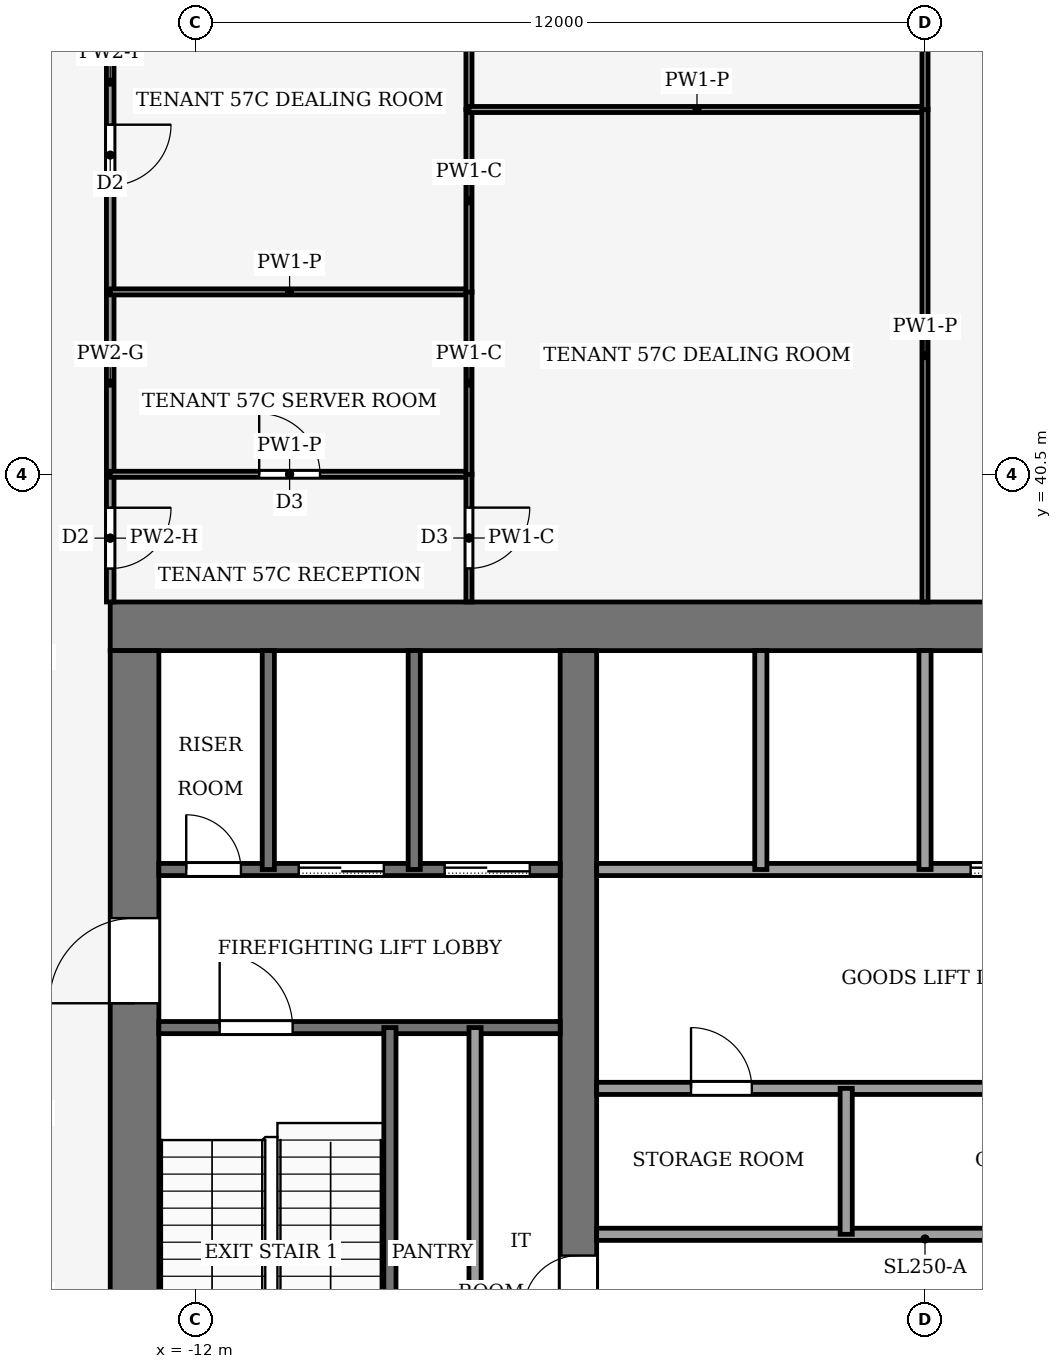
"""IFC4 building model, lengths in metres.
Left out: names, types, materials, properties, quantities, classifications, styles, units other than length and angle.
Written with IfcOpenShell. Run it as: python <this file> out.ifc"""

import sys

from ifc_helpers import new_model, si_unit, direction, frame, frame_2d, origin, place, context, subcontext, project, spatial, rectangle, extrude, element, fill, save


model = new_model("IFC4")
c1 = context("Model", 3, precision=1e-05, world=origin(), true_north=direction((0.0, 1.0)))
c2 = subcontext(c1, "Body", "Model", "MODEL_VIEW")
j1 = project(units=[si_unit("LENGTHUNIT", "METRE"), si_unit("PLANEANGLEUNIT", "RADIAN")], contexts=[c1])
p1 = place(None, origin())
s1 = spatial("IfcSite", under=j1, at=p1, CompositionType="ELEMENT")
p2 = place(p1, origin())
s2 = spatial("IfcBuilding", under=s1, at=p2, CompositionType="ELEMENT")
p3 = place(p2, frame((0.0, 0.0, 250.0)))
s3 = spatial("IfcBuildingStorey", under=s2, at=p3, CompositionType="ELEMENT", Elevation=250.0)
p4 = place(p3, frame((-13.4, 38.0, -0.13), z_axis=(0.0, 0.0, 1.0), x_axis=(1.0, 0.0, 0.0)))
e1 = element("IfcWall", 1, at=p4, inside=s3, PredefinedType="SHEAR", context=c2, shape_type="SweptSolid", body=[
    extrude(rectangle(XDim=26.8, YDim=0.8, at=frame_2d((13.4, 0.0))), origin(), (0.0, 0.0, 1.0), 4.0),
])
p5 = place(p3, frame((-13.0, 18.4, -0.13), z_axis=(0.0, 0.0, 1.0), x_axis=(0.0, 1.0, 0.0)))
e2 = element("IfcWall", 2, at=p5, inside=s3, PredefinedType="SHEAR", context=c2, shape_type="SweptSolid", body=[
    extrude(rectangle(XDim=19.2, YDim=0.8, at=frame_2d((9.6, 0.0))), origin(), (0.0, 0.0, 1.0), 4.0),
])
p6 = place(p5, frame((2.8, 0.0, 0.13)))
e3 = element("IfcOpeningElement", 3, at=p6, cuts=e2, PredefinedType="OPENING", context=c2, shape_type="SweptSolid", body=[
    extrude(rectangle(XDim=2.4, YDim=2.4, at=frame_2d((1.2, 1.2))), frame((0.0, 0.41, 0.0), z_axis=(0.0, -1.0, 0.0), x_axis=(1.0, 0.0, 0.0)), (0.0, 0.0, 1.0), 0.82),
])
p7 = place(p5, frame((13.4, 0.0, 0.13)))
e4 = element("IfcOpeningElement", 4, at=p7, cuts=e2, PredefinedType="OPENING", context=c2, shape_type="SweptSolid", body=[
    extrude(rectangle(XDim=1.4, YDim=2.2, at=frame_2d((0.7, 1.1))), frame((0.0, 0.41, 0.0), z_axis=(0.0, -1.0, 0.0), x_axis=(1.0, 0.0, 0.0)), (0.0, 0.0, 1.0), 0.82),
])
p8 = place(p3, frame((-5.7, 18.4, -0.13), z_axis=(0.0, 0.0, 1.0), x_axis=(0.0, 1.0, 0.0)))
e5 = element("IfcWall", 5, at=p8, inside=s3, PredefinedType="SHEAR", context=c2, shape_type="SweptSolid", body=[
    extrude(rectangle(XDim=19.2, YDim=0.6, at=frame_2d((9.6, 0.0))), origin(), (0.0, 0.0, 1.0), 4.0),
])
p9 = place(p8, frame((8.35, 0.0, 0.13)))
e6 = element("IfcOpeningElement", 6, at=p9, cuts=e5, PredefinedType="OPENING", context=c2, shape_type="SweptSolid", body=[
    extrude(rectangle(XDim=0.9, YDim=2.1, at=frame_2d((0.45, 1.05))), frame((0.0, 0.31, 0.0), z_axis=(0.0, -1.0, 0.0), x_axis=(1.0, 0.0, 0.0)), (0.0, 0.0, 1.0), 0.62),
])
p10 = place(p3, frame((-5.4, 28.0, 0.0), z_axis=(0.0, 0.0, 1.0), x_axis=(1.0, 0.0, 0.0)))
e7 = element("IfcWall", 7, at=p10, inside=s3, PredefinedType="PARTITIONING", context=c2, shape_type="SweptSolid", body=[
    extrude(rectangle(XDim=10.8, YDim=0.2, at=frame_2d((5.4, 0.0))), origin(), (0.0, 0.0, 1.0), 3.87),
])
p11 = place(p3, frame((-5.4, 30.4, 0.0), z_axis=(0.0, 0.0, 1.0), x_axis=(1.0, 0.0, 0.0)))
e8 = element("IfcWall", 8, at=p11, inside=s3, PredefinedType="PARTITIONING", context=c2, shape_type="SweptSolid", body=[
    extrude(rectangle(XDim=10.8, YDim=0.2, at=frame_2d((5.4, 0.0))), origin(), (0.0, 0.0, 1.0), 3.87),
])
p12 = place(p11, frame((1.552, 0.0, 0.0)))
e9 = element("IfcOpeningElement", 9, at=p12, cuts=e8, PredefinedType="OPENING", context=c2, shape_type="SweptSolid", body=[
    extrude(rectangle(XDim=1.0, YDim=2.1, at=frame_2d((0.5, 1.05))), frame((0.0, 0.11, 0.0), z_axis=(0.0, -1.0, 0.0), x_axis=(1.0, 0.0, 0.0)), (0.0, 0.0, 1.0), 0.22),
])
p13 = place(p11, frame((6.952, 0.0, 0.0)))
e10 = element("IfcOpeningElement", 10, at=p13, cuts=e8, PredefinedType="OPENING", context=c2, shape_type="SweptSolid", body=[
    extrude(rectangle(XDim=1.0, YDim=2.1, at=frame_2d((0.5, 1.05))), frame((0.0, 0.11, 0.0), z_axis=(0.0, -1.0, 0.0), x_axis=(1.0, 0.0, 0.0)), (0.0, 0.0, 1.0), 0.22),
])
p14 = place(p3, frame((-12.6, 31.4, 0.0), z_axis=(0.0, 0.0, 1.0), x_axis=(1.0, 0.0, 0.0)))
e11 = element("IfcWall", 11, at=p14, inside=s3, PredefinedType="PARTITIONING", context=c2, shape_type="SweptSolid", body=[
    extrude(rectangle(XDim=6.6, YDim=0.2, at=frame_2d((3.3, 0.0))), origin(), (0.0, 0.0, 1.0), 3.87),
])
p15 = place(p14, frame((1.0, 0.0, 0.0)))
e12 = element("IfcOpeningElement", 12, at=p15, cuts=e11, PredefinedType="OPENING", context=c2, shape_type="SweptSolid", body=[
    extrude(rectangle(XDim=1.2, YDim=2.2, at=frame_2d((0.6, 1.1))), frame((0.0, 0.11, 0.0), z_axis=(0.0, -1.0, 0.0), x_axis=(1.0, 0.0, 0.0)), (0.0, 0.0, 1.0), 0.22),
])
p16 = place(p3, frame((-12.6, 34.0, 0.0), z_axis=(0.0, 0.0, 1.0), x_axis=(1.0, 0.0, 0.0)))
e13 = element("IfcWall", 13, at=p16, inside=s3, PredefinedType="PARTITIONING", context=c2, shape_type="SweptSolid", body=[
    extrude(rectangle(XDim=6.6, YDim=0.2, at=frame_2d((3.3, 0.0))), origin(), (0.0, 0.0, 1.0), 3.87),
])
p17 = place(p16, frame((4.7, 0.0, 0.0)))
e14 = element("IfcOpeningElement", 14, at=p17, cuts=e13, PredefinedType="OPENING", context=c2, shape_type="SweptSolid", body=[
    extrude(rectangle(XDim=1.4, YDim=2.2, at=frame_2d((0.7, 1.1))), frame((0.0, 0.11, 0.0), z_axis=(0.0, -1.0, 0.0), x_axis=(1.0, 0.0, 0.0)), (0.0, 0.0, 1.0), 0.22),
])
p18 = place(p16, frame((2.3, 0.0, 0.0)))
e15 = element("IfcOpeningElement", 15, at=p18, cuts=e13, PredefinedType="OPENING", context=c2, shape_type="SweptSolid", body=[
    extrude(rectangle(XDim=1.4, YDim=2.2, at=frame_2d((0.7, 1.1))), frame((0.0, 0.11, 0.0), z_axis=(0.0, -1.0, 0.0), x_axis=(1.0, 0.0, 0.0)), (0.0, 0.0, 1.0), 0.22),
])
p19 = place(p16, frame((0.45, 0.0, 0.0)))
e16 = element("IfcOpeningElement", 16, at=p19, cuts=e13, PredefinedType="OPENING", context=c2, shape_type="SweptSolid", body=[
    extrude(rectangle(XDim=0.9, YDim=2.1, at=frame_2d((0.45, 1.05))), frame((0.0, 0.11, 0.0), z_axis=(0.0, -1.0, 0.0), x_axis=(1.0, 0.0, 0.0)), (0.0, 0.0, 1.0), 0.22),
])
p20 = place(p3, frame((-5.4, 34.0, 0.0), z_axis=(0.0, 0.0, 1.0), x_axis=(1.0, 0.0, 0.0)))
e17 = element("IfcWall", 17, at=p20, inside=s3, PredefinedType="PARTITIONING", context=c2, shape_type="SweptSolid", body=[
    extrude(rectangle(XDim=10.8, YDim=0.2, at=frame_2d((5.4, 0.0))), origin(), (0.0, 0.0, 1.0), 3.87),
])
p21 = place(p20, frame((6.15, 0.0, 0.0)))
e18 = element("IfcOpeningElement", 18, at=p21, cuts=e17, PredefinedType="OPENING", context=c2, shape_type="SweptSolid", body=[
    extrude(rectangle(XDim=1.2, YDim=2.2, at=frame_2d((0.6, 1.1))), frame((0.0, 0.11, 0.0), z_axis=(0.0, -1.0, 0.0), x_axis=(1.0, 0.0, 0.0)), (0.0, 0.0, 1.0), 0.22),
])
p22 = place(p20, frame((8.95, 0.0, 0.0)))
e19 = element("IfcOpeningElement", 19, at=p22, cuts=e17, PredefinedType="OPENING", context=c2, shape_type="SweptSolid", body=[
    extrude(rectangle(XDim=1.0, YDim=2.1, at=frame_2d((0.5, 1.05))), frame((0.0, 0.11, 0.0), z_axis=(0.0, -1.0, 0.0), x_axis=(1.0, 0.0, 0.0)), (0.0, 0.0, 1.0), 0.22),
])
p23 = place(p3, frame((-10.8, 34.0, 0.0), z_axis=(0.0, 0.0, 1.0), x_axis=(0.0, 1.0, 0.0)))
e20 = element("IfcWall", 20, at=p23, inside=s3, PredefinedType="PARTITIONING", context=c2, shape_type="SweptSolid", body=[
    extrude(rectangle(XDim=3.6, YDim=0.2, at=frame_2d((1.8, 0.0))), origin(), (0.0, 0.0, 1.0), 3.87),
])
p24 = place(p3, frame((-8.8, 24.0, 0.0), z_axis=(0.0, 0.0, 1.0), x_axis=(0.0, 1.0, 0.0)))
e21 = element("IfcWall", 21, at=p24, inside=s3, PredefinedType="PARTITIONING", context=c2, shape_type="SweptSolid", body=[
    extrude(rectangle(XDim=7.4, YDim=0.2, at=frame_2d((3.7, 0.0))), origin(), (0.0, 0.0, 1.0), 3.87),
])
p25 = place(p3, frame((-8.4, 34.0, 0.0), z_axis=(0.0, 0.0, 1.0), x_axis=(0.0, 1.0, 0.0)))
e22 = element("IfcWall", 22, at=p25, inside=s3, PredefinedType="PARTITIONING", context=c2, shape_type="SweptSolid", body=[
    extrude(rectangle(XDim=3.6, YDim=0.2, at=frame_2d((1.8, 0.0))), origin(), (0.0, 0.0, 1.0), 3.87),
])
p26 = place(p3, frame((-7.4, 24.0, 0.0), z_axis=(0.0, 0.0, 1.0), x_axis=(0.0, 1.0, 0.0)))
e23 = element("IfcWall", 23, at=p26, inside=s3, PredefinedType="PARTITIONING", context=c2, shape_type="SweptSolid", body=[
    extrude(rectangle(XDim=7.4, YDim=0.2, at=frame_2d((3.7, 0.0))), origin(), (0.0, 0.0, 1.0), 3.87),
])
p27 = place(p3, frame((-2.7, 34.0, 0.0), z_axis=(0.0, 0.0, 1.0), x_axis=(0.0, 1.0, 0.0)))
e24 = element("IfcWall", 24, at=p27, inside=s3, PredefinedType="PARTITIONING", context=c2, shape_type="SweptSolid", body=[
    extrude(rectangle(XDim=3.6, YDim=0.2, at=frame_2d((1.8, 0.0))), origin(), (0.0, 0.0, 1.0), 3.87),
])
p28 = place(p3, frame((-1.296, 28.0, 0.0), z_axis=(0.0, 0.0, 1.0), x_axis=(0.0, 1.0, 0.0)))
e25 = element("IfcWall", 25, at=p28, inside=s3, PredefinedType="PARTITIONING", context=c2, shape_type="SweptSolid", body=[
    extrude(rectangle(XDim=2.4, YDim=0.2, at=frame_2d((1.2, 0.0))), origin(), (0.0, 0.0, 1.0), 3.87),
])
p29 = place(p3, frame((0.0, 34.0, 0.0), z_axis=(0.0, 0.0, 1.0), x_axis=(0.0, 1.0, 0.0)))
e26 = element("IfcWall", 26, at=p29, inside=s3, PredefinedType="PARTITIONING", context=c2, shape_type="SweptSolid", body=[
    extrude(rectangle(XDim=3.6, YDim=0.2, at=frame_2d((1.8, 0.0))), origin(), (0.0, 0.0, 1.0), 3.87),
])
p30 = place(p3, frame((-13.4, 40.5, 0.0), z_axis=(0.0, 0.0, 1.0), x_axis=(0.0, -1.0, 0.0)))
e27 = element("IfcWall", 27, at=p30, inside=s3, PredefinedType="PARTITIONING", context=c2, shape_type="SweptSolid", body=[
    extrude(rectangle(XDim=2.1, YDim=0.125, at=frame_2d((1.05, 0.0))), origin(), (0.0, 0.0, 1.0), 3.14),
])
p31 = place(p30, frame((0.55, 0.0, 0.0)))
e28 = element("IfcOpeningElement", 28, at=p31, cuts=e27, PredefinedType="OPENING", context=c2, shape_type="SweptSolid", body=[
    extrude(rectangle(XDim=1.0, YDim=2.1, at=frame_2d((0.5, 1.05))), frame((0.0, 0.073, 0.0), z_axis=(0.0, -1.0, 0.0), x_axis=(1.0, 0.0, 0.0)), (0.0, 0.0, 1.0), 0.145),
])
p32 = place(p3, frame((-13.4, 40.5, 0.0), z_axis=(0.0, 0.0, 1.0), x_axis=(0.0, 1.0, 0.0)))
e29 = element("IfcWall", 29, at=p32, inside=s3, PredefinedType="PARTITIONING", context=c2, shape_type="SweptSolid", body=[
    extrude(rectangle(XDim=3.0, YDim=0.125, at=frame_2d((1.5, 0.0))), origin(), (0.0, 0.0, 1.0), 3.87),
])
p33 = place(p3, frame((-13.4, 50.4, 0.0), z_axis=(0.0, 0.0, 1.0), x_axis=(0.0, -1.0, 0.0)))
e30 = element("IfcWall", 30, at=p33, inside=s3, PredefinedType="PARTITIONING", context=c2, shape_type="SweptSolid", body=[
    extrude(rectangle(XDim=6.9, YDim=0.125, at=frame_2d((3.45, 0.0))), origin(), (0.0, 0.0, 1.0), 3.24),
])
p34 = place(p33, frame((4.15, 0.0, 0.0)))
e31 = element("IfcOpeningElement", 31, at=p34, cuts=e30, PredefinedType="OPENING", context=c2, shape_type="SweptSolid", body=[
    extrude(rectangle(XDim=1.0, YDim=2.1, at=frame_2d((0.5, 1.05))), frame((0.0, 0.073, 0.0), z_axis=(0.0, -1.0, 0.0), x_axis=(1.0, 0.0, 0.0)), (0.0, 0.0, 1.0), 0.145),
])
p35 = place(p3, frame((-13.4, 40.5, 0.0), z_axis=(0.0, 0.0, 1.0), x_axis=(1.0, 0.0, 0.0)))
e32 = element("IfcWall", 32, at=p35, inside=s3, PredefinedType="PARTITIONING", context=c2, shape_type="SweptSolid", body=[
    extrude(rectangle(XDim=5.9, YDim=0.1, at=frame_2d((2.95, 0.0))), origin(), (0.0, 0.0, 1.0), 3.44),
])
p36 = place(p35, frame((2.45, 0.0, 0.0)))
e33 = element("IfcOpeningElement", 33, at=p36, cuts=e32, PredefinedType="OPENING", context=c2, shape_type="SweptSolid", body=[
    extrude(rectangle(XDim=1.0, YDim=2.1, at=frame_2d((0.5, 1.05))), frame((0.0, 0.06, 0.0), z_axis=(0.0, -1.0, 0.0), x_axis=(1.0, 0.0, 0.0)), (0.0, 0.0, 1.0), 0.12),
])
p37 = place(p3, frame((-7.5, 40.504, 0.0), z_axis=(0.0, 0.0, 1.0), x_axis=(0.0, -1.0, 0.0)))
e34 = element("IfcWall", 34, at=p37, inside=s3, PredefinedType="PARTITIONING", context=c2, shape_type="SweptSolid", body=[
    extrude(rectangle(XDim=2.104, YDim=0.1, at=frame_2d((1.052, 0.0))), origin(), (0.0, 0.0, 1.0), 3.87),
])
p38 = place(p37, frame((0.552, 0.0, 0.0)))
e35 = element("IfcOpeningElement", 35, at=p38, cuts=e34, PredefinedType="OPENING", context=c2, shape_type="SweptSolid", body=[
    extrude(rectangle(XDim=1.0, YDim=2.1, at=frame_2d((0.5, 1.05))), frame((0.0, 0.06, 0.0), z_axis=(0.0, -1.0, 0.0), x_axis=(1.0, 0.0, 0.0)), (0.0, 0.0, 1.0), 0.12),
])
p39 = place(p3, frame((-7.5, 43.5, 0.0), z_axis=(0.0, 0.0, 1.0), x_axis=(-1.0, 0.0, 0.0)))
e36 = element("IfcWall", 36, at=p39, inside=s3, PredefinedType="PARTITIONING", context=c2, shape_type="SweptSolid", body=[
    extrude(rectangle(XDim=5.9, YDim=0.1, at=frame_2d((2.95, 0.0))), origin(), (0.0, 0.0, 1.0), 3.44),
])
p40 = place(p3, frame((-7.5, 40.496, 0.0), z_axis=(0.0, 0.0, 1.0), x_axis=(0.0, 1.0, 0.0)))
e37 = element("IfcWall", 37, at=p40, inside=s3, PredefinedType="PARTITIONING", context=c2, shape_type="SweptSolid", body=[
    extrude(rectangle(XDim=3.008, YDim=0.1, at=frame_2d((1.504, 0.0))), origin(), (0.0, 0.0, 1.0), 3.87),
])
p41 = place(p3, frame((-7.5, 43.496, 0.0), z_axis=(0.0, 0.0, 1.0), x_axis=(0.0, 1.0, 0.0)))
e38 = element("IfcWall", 38, at=p41, inside=s3, PredefinedType="PARTITIONING", context=c2, shape_type="SweptSolid", body=[
    extrude(rectangle(XDim=3.004, YDim=0.1, at=frame_2d((1.502, 0.0))), origin(), (0.0, 0.0, 1.0), 3.87),
])
p42 = place(p3, frame((-7.5, 46.5, 0.0), z_axis=(0.0, 0.0, 1.0), x_axis=(0.0, 1.0, 0.0)))
e39 = element("IfcWall", 39, at=p42, inside=s3, PredefinedType="PARTITIONING", context=c2, shape_type="SweptSolid", body=[
    extrude(rectangle(XDim=3.9, YDim=0.1, at=frame_2d((1.95, 0.0))), origin(), (0.0, 0.0, 1.0), 3.24),
])
p43 = place(p3, frame((0.0, 46.5, 0.0), z_axis=(0.0, 0.0, 1.0), x_axis=(-1.0, 0.0, 0.0)))
e40 = element("IfcWall", 40, at=p43, inside=s3, PredefinedType="PARTITIONING", context=c2, shape_type="SweptSolid", body=[
    extrude(rectangle(XDim=7.5, YDim=0.1, at=frame_2d((3.75, 0.0))), origin(), (0.0, 0.0, 1.0), 3.44),
])
p44 = place(p3, frame((0.0, 38.4, 0.0), z_axis=(0.0, 0.0, 1.0), x_axis=(0.0, 1.0, 0.0)))
e41 = element("IfcWall", 41, at=p44, inside=s3, PredefinedType="PARTITIONING", context=c2, shape_type="SweptSolid", body=[
    extrude(rectangle(XDim=8.104, YDim=0.1, at=frame_2d((4.052, 0.0))), origin(), (0.0, 0.0, 1.0), 3.44),
])
p45 = place(p3, frame((0.0, 46.496, 0.0), z_axis=(0.0, 0.0, 1.0), x_axis=(0.0, 1.0, 0.0)))
e42 = element("IfcWall", 42, at=p45, inside=s3, PredefinedType="PARTITIONING", context=c2, shape_type="SweptSolid", body=[
    extrude(rectangle(XDim=3.904, YDim=0.1, at=frame_2d((1.952, 0.0))), origin(), (0.0, 0.0, 1.0), 3.29),
])
p46 = place(p21, origin())
e43 = element("IfcDoor", 43, at=p46, inside=s3, OperationType="SLIDING_TO_LEFT", PredefinedType="DOOR", context=c2, shape_type="SweptSolid", body=[
    extrude(rectangle(XDim=1.2, YDim=2.2, at=frame_2d((0.6, 1.1))), frame((0.0, 0.025, 0.0), z_axis=(0.0, -1.0, 0.0), x_axis=(1.0, 0.0, 0.0)), (0.0, 0.0, 1.0), 0.05),
])
fill(e18, e43)
p47 = place(p17, origin())
e44 = element("IfcDoor", 44, at=p47, inside=s3, OperationType="SLIDING_TO_LEFT", PredefinedType="DOOR", context=c2, shape_type="SweptSolid", body=[
    extrude(rectangle(XDim=1.4, YDim=2.2, at=frame_2d((0.7, 1.1))), frame((0.0, 0.025, 0.0), z_axis=(0.0, -1.0, 0.0), x_axis=(1.0, 0.0, 0.0)), (0.0, 0.0, 1.0), 0.05),
])
fill(e14, e44)
p48 = place(p18, origin())
e45 = element("IfcDoor", 45, at=p48, inside=s3, OperationType="SLIDING_TO_LEFT", PredefinedType="DOOR", context=c2, shape_type="SweptSolid", body=[
    extrude(rectangle(XDim=1.4, YDim=2.2, at=frame_2d((0.7, 1.1))), frame((0.0, 0.025, 0.0), z_axis=(0.0, -1.0, 0.0), x_axis=(1.0, 0.0, 0.0)), (0.0, 0.0, 1.0), 0.05),
])
fill(e15, e45)
p49 = place(p19, origin())
e46 = element("IfcDoor", 46, at=p49, inside=s3, OperationType="SINGLE_SWING_RIGHT", PredefinedType="DOOR", context=c2, shape_type="SweptSolid", body=[
    extrude(rectangle(XDim=0.9, YDim=2.1, at=frame_2d((0.45, 1.05))), frame((0.0, 0.025, 0.0), z_axis=(0.0, -1.0, 0.0), x_axis=(1.0, 0.0, 0.0)), (0.0, 0.0, 1.0), 0.05),
])
fill(e16, e46)
p50 = place(p12, origin())
e47 = element("IfcDoor", 47, at=p50, inside=s3, OperationType="SINGLE_SWING_LEFT", PredefinedType="DOOR", context=c2, shape_type="SweptSolid", body=[
    extrude(rectangle(XDim=1.0, YDim=2.1, at=frame_2d((0.5, 1.05))), frame((0.0, 0.025, 0.0), z_axis=(0.0, -1.0, 0.0), x_axis=(1.0, 0.0, 0.0)), (0.0, 0.0, 1.0), 0.05),
])
fill(e9, e47)
p51 = place(p9, origin())
e48 = element("IfcDoor", 48, at=p51, inside=s3, OperationType="SINGLE_SWING_RIGHT", PredefinedType="DOOR", context=c2, shape_type="SweptSolid", body=[
    extrude(rectangle(XDim=0.9, YDim=2.1, at=frame_2d((0.45, 1.05))), frame((0.0, 0.025, 0.0), z_axis=(0.0, -1.0, 0.0), x_axis=(1.0, 0.0, 0.0)), (0.0, 0.0, 1.0), 0.05),
])
fill(e6, e48)
p52 = place(p15, origin())
e49 = element("IfcDoor", 49, at=p52, inside=s3, OperationType="SINGLE_SWING_RIGHT", PredefinedType="DOOR", context=c2, shape_type="SweptSolid", body=[
    extrude(rectangle(XDim=1.2, YDim=2.2, at=frame_2d((0.6, 1.1))), frame((0.0, 0.025, 0.0), z_axis=(0.0, -1.0, 0.0), x_axis=(1.0, 0.0, 0.0)), (0.0, 0.0, 1.0), 0.05),
])
fill(e12, e49)
p53 = place(p7, origin())
e50 = element("IfcDoor", 50, at=p53, inside=s3, OperationType="SINGLE_SWING_RIGHT", PredefinedType="DOOR", context=c2, shape_type="SweptSolid", body=[
    extrude(rectangle(XDim=1.4, YDim=2.2, at=frame_2d((0.7, 1.1))), frame((0.0, 0.025, 0.0), z_axis=(0.0, -1.0, 0.0), x_axis=(1.0, 0.0, 0.0)), (0.0, 0.0, 1.0), 0.05),
])
fill(e4, e50)
p54 = place(p31, origin())
e51 = element("IfcDoor", 51, at=p54, inside=s3, OperationType="SINGLE_SWING_RIGHT", PredefinedType="DOOR", context=c2, shape_type="SweptSolid", body=[
    extrude(rectangle(XDim=1.0, YDim=2.1, at=frame_2d((0.5, 1.05))), frame((0.0, 0.025, 0.0), z_axis=(0.0, -1.0, 0.0), x_axis=(1.0, 0.0, 0.0)), (0.0, 0.0, 1.0), 0.05),
])
fill(e28, e51)
p55 = place(p34, origin())
e52 = element("IfcDoor", 52, at=p55, inside=s3, OperationType="SINGLE_SWING_RIGHT", PredefinedType="DOOR", context=c2, shape_type="SweptSolid", body=[
    extrude(rectangle(XDim=1.0, YDim=2.1, at=frame_2d((0.5, 1.05))), frame((0.0, 0.025, 0.0), z_axis=(0.0, -1.0, 0.0), x_axis=(1.0, 0.0, 0.0)), (0.0, 0.0, 1.0), 0.05),
])
fill(e31, e52)
p56 = place(p36, origin())
e53 = element("IfcDoor", 53, at=p56, inside=s3, OperationType="SINGLE_SWING_LEFT", PredefinedType="DOOR", context=c2, shape_type="SweptSolid", body=[
    extrude(rectangle(XDim=1.0, YDim=2.1, at=frame_2d((0.5, 1.05))), frame((0.0, 0.025, 0.0), z_axis=(0.0, -1.0, 0.0), x_axis=(1.0, 0.0, 0.0)), (0.0, 0.0, 1.0), 0.05),
])
fill(e33, e53)
p57 = place(p38, origin())
e54 = element("IfcDoor", 54, at=p57, inside=s3, OperationType="SINGLE_SWING_RIGHT", PredefinedType="DOOR", context=c2, shape_type="SweptSolid", body=[
    extrude(rectangle(XDim=1.0, YDim=2.1, at=frame_2d((0.5, 1.05))), frame((0.0, 0.025, 0.0), z_axis=(0.0, -1.0, 0.0), x_axis=(1.0, 0.0, 0.0)), (0.0, 0.0, 1.0), 0.05),
])
fill(e35, e54)
save(model, sys.argv[1])
